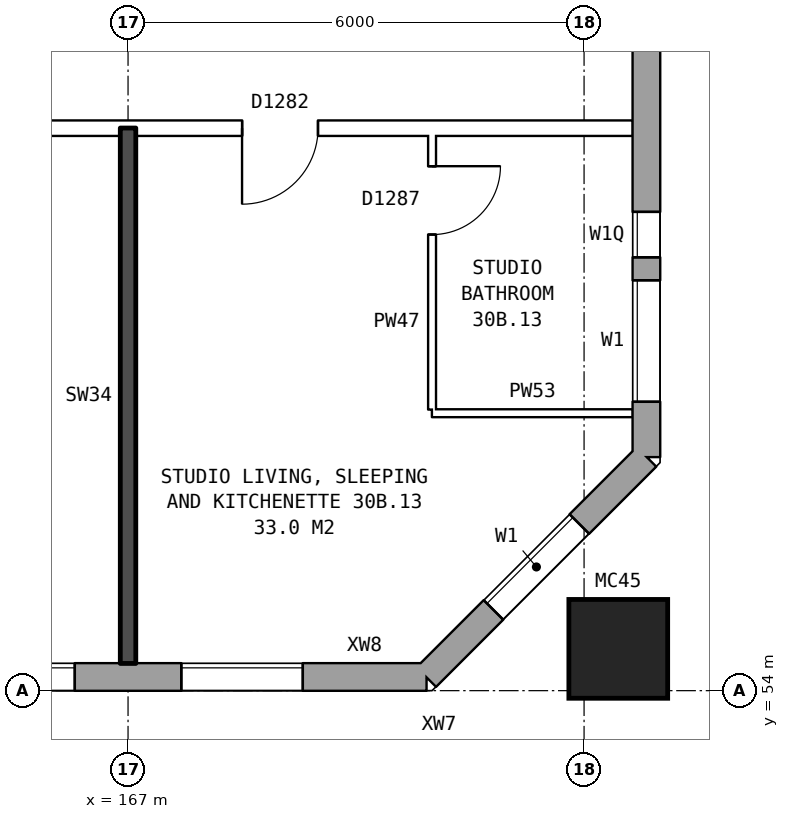
"""IFC4 building model, lengths in metres.
Left out: names, types, materials, properties, quantities, classifications, styles, units other than length and angle.
Written with IfcOpenShell. Run it as: python <this file> out.ifc"""

import sys

from ifc_helpers import new_model, si_unit, direction, frame, frame_2d, origin, origin_2d, place, context, subcontext, project, spatial, rectangle, hollow_rectangle, extrude, element, fill, save


model = new_model("IFC4")
c1 = context("Model", 3, precision=1e-05, world=origin(), true_north=direction((0.0, 1.0)))
c2 = subcontext(c1, "Body", "Model", "MODEL_VIEW")
j1 = project(units=[si_unit("LENGTHUNIT", "METRE"), si_unit("PLANEANGLEUNIT", "RADIAN")], contexts=[c1])
p1 = place(None, origin())
s1 = spatial("IfcSite", under=j1, at=p1, CompositionType="ELEMENT")
p2 = place(p1, origin())
s2 = spatial("IfcBuilding", under=s1, at=p2, CompositionType="ELEMENT")
p3 = place(p2, frame((0.0, 0.0, 108.8)))
s3 = spatial("IfcBuildingStorey", under=s2, at=p3, CompositionType="ELEMENT", Elevation=108.8)
p4 = place(p3, frame((173.45, 54.55, 0.0), z_axis=(0.0, 0.0, 1.0), x_axis=(1.0, 0.0, 0.0)))
e1 = element("IfcColumn", 1, at=p4, inside=s3, PredefinedType="COLUMN", context=c2, shape_type="SweptSolid", body=[
    extrude(hollow_rectangle(XDim=1.3, YDim=1.3, WallThickness=0.07, at=origin_2d()), origin(), (0.0, 0.0, 1.0), 3.1),
])
p5 = place(p3, frame((134.075, 54.18, 0.0), z_axis=(0.0, 0.0, 1.0), x_axis=(1.0, 0.0, 0.0)))
e2 = element("IfcWall", 2, at=p5, inside=s3, PredefinedType="STANDARD", context=c2, shape_type="SweptSolid", body=[
    extrude(rectangle(XDim=36.851, YDim=0.36, at=frame_2d((18.425, 0.0))), origin(), (0.0, 0.0, 1.0), 2.85),
])
p6 = place(p5, frame((0.625, 0.0, 0.8)))
e3 = element("IfcOpeningElement", 3, at=p6, cuts=e2, PredefinedType="OPENING", context=c2, shape_type="SweptSolid", body=[
    extrude(rectangle(XDim=1.6, YDim=1.8, at=frame_2d((0.8, 0.9))), frame((0.0, 0.19, 0.0), z_axis=(0.0, -1.0, 0.0), x_axis=(1.0, 0.0, 0.0)), (0.0, 0.0, 1.0), 0.38),
])
p7 = place(p5, frame((3.625, 0.0, 0.8)))
e4 = element("IfcOpeningElement", 4, at=p7, cuts=e2, PredefinedType="OPENING", context=c2, shape_type="SweptSolid", body=[
    extrude(rectangle(XDim=1.6, YDim=1.8, at=frame_2d((0.8, 0.9))), frame((0.0, 0.19, 0.0), z_axis=(0.0, -1.0, 0.0), x_axis=(1.0, 0.0, 0.0)), (0.0, 0.0, 1.0), 0.38),
])
p8 = place(p5, frame((6.625, 0.0, 0.8)))
e5 = element("IfcOpeningElement", 5, at=p8, cuts=e2, PredefinedType="OPENING", context=c2, shape_type="SweptSolid", body=[
    extrude(rectangle(XDim=1.6, YDim=1.8, at=frame_2d((0.8, 0.9))), frame((0.0, 0.19, 0.0), z_axis=(0.0, -1.0, 0.0), x_axis=(1.0, 0.0, 0.0)), (0.0, 0.0, 1.0), 0.38),
])
p9 = place(p5, frame((9.625, 0.0, 0.8)))
e6 = element("IfcOpeningElement", 6, at=p9, cuts=e2, PredefinedType="OPENING", context=c2, shape_type="SweptSolid", body=[
    extrude(rectangle(XDim=1.6, YDim=1.8, at=frame_2d((0.8, 0.9))), frame((0.0, 0.19, 0.0), z_axis=(0.0, -1.0, 0.0), x_axis=(1.0, 0.0, 0.0)), (0.0, 0.0, 1.0), 0.38),
])
p10 = place(p5, frame((12.075, 0.0, 1.65)))
e7 = element("IfcOpeningElement", 7, at=p10, cuts=e2, PredefinedType="OPENING", context=c2, shape_type="SweptSolid", body=[
    extrude(rectangle(XDim=1.0, YDim=0.9, at=frame_2d((0.5, 0.45))), frame((0.0, 0.19, 0.0), z_axis=(0.0, -1.0, 0.0), x_axis=(1.0, 0.0, 0.0)), (0.0, 0.0, 1.0), 0.38),
])
p11 = place(p5, frame((15.625, 0.0, 0.8)))
e8 = element("IfcOpeningElement", 8, at=p11, cuts=e2, PredefinedType="OPENING", context=c2, shape_type="SweptSolid", body=[
    extrude(rectangle(XDim=1.6, YDim=1.8, at=frame_2d((0.8, 0.9))), frame((0.0, 0.19, 0.0), z_axis=(0.0, -1.0, 0.0), x_axis=(1.0, 0.0, 0.0)), (0.0, 0.0, 1.0), 0.38),
])
p12 = place(p5, frame((18.625, 0.0, 0.8)))
e9 = element("IfcOpeningElement", 9, at=p12, cuts=e2, PredefinedType="OPENING", context=c2, shape_type="SweptSolid", body=[
    extrude(rectangle(XDim=1.6, YDim=1.8, at=frame_2d((0.8, 0.9))), frame((0.0, 0.19, 0.0), z_axis=(0.0, -1.0, 0.0), x_axis=(1.0, 0.0, 0.0)), (0.0, 0.0, 1.0), 0.38),
])
p13 = place(p5, frame((21.125, 0.0, 0.8)))
e10 = element("IfcOpeningElement", 10, at=p13, cuts=e2, PredefinedType="OPENING", context=c2, shape_type="SweptSolid", body=[
    extrude(rectangle(XDim=1.4, YDim=0.9, at=frame_2d((0.7, 0.45))), frame((0.0, 0.19, 0.0), z_axis=(0.0, -1.0, 0.0), x_axis=(1.0, 0.0, 0.0)), (0.0, 0.0, 1.0), 0.38),
])
p14 = place(p5, frame((24.625, 0.0, 0.8)))
e11 = element("IfcOpeningElement", 11, at=p14, cuts=e2, PredefinedType="OPENING", context=c2, shape_type="SweptSolid", body=[
    extrude(rectangle(XDim=1.6, YDim=1.8, at=frame_2d((0.8, 0.9))), frame((0.0, 0.19, 0.0), z_axis=(0.0, -1.0, 0.0), x_axis=(1.0, 0.0, 0.0)), (0.0, 0.0, 1.0), 0.38),
])
p15 = place(p5, frame((27.625, 0.0, 0.8)))
e12 = element("IfcOpeningElement", 12, at=p15, cuts=e2, PredefinedType="OPENING", context=c2, shape_type="SweptSolid", body=[
    extrude(rectangle(XDim=1.6, YDim=1.8, at=frame_2d((0.8, 0.9))), frame((0.0, 0.19, 0.0), z_axis=(0.0, -1.0, 0.0), x_axis=(1.0, 0.0, 0.0)), (0.0, 0.0, 1.0), 0.38),
])
p16 = place(p5, frame((30.625, 0.0, 0.8)))
e13 = element("IfcOpeningElement", 13, at=p16, cuts=e2, PredefinedType="OPENING", context=c2, shape_type="SweptSolid", body=[
    extrude(rectangle(XDim=1.6, YDim=1.8, at=frame_2d((0.8, 0.9))), frame((0.0, 0.19, 0.0), z_axis=(0.0, -1.0, 0.0), x_axis=(1.0, 0.0, 0.0)), (0.0, 0.0, 1.0), 0.38),
])
p17 = place(p5, frame((33.625, 0.0, 0.8)))
e14 = element("IfcOpeningElement", 14, at=p17, cuts=e2, PredefinedType="OPENING", context=c2, shape_type="SweptSolid", body=[
    extrude(rectangle(XDim=1.6, YDim=1.8, at=frame_2d((0.8, 0.9))), frame((0.0, 0.19, 0.0), z_axis=(0.0, -1.0, 0.0), x_axis=(1.0, 0.0, 0.0)), (0.0, 0.0, 1.0), 0.38),
])
p18 = place(p5, frame((13.525, 0.0, 0.15)))
e15 = element("IfcOpeningElement", 15, at=p18, cuts=e2, PredefinedType="OPENING", context=c2, shape_type="SweptSolid", body=[
    extrude(rectangle(XDim=1.2, YDim=0.9, at=frame_2d((0.6, 0.45))), frame((0.0, 0.19, 0.0), z_axis=(0.0, -1.0, 0.0), x_axis=(1.0, 0.0, 0.0)), (0.0, 0.0, 1.0), 0.38),
])
p19 = place(p5, frame((23.725, 0.0, 1.7)))
e16 = element("IfcOpeningElement", 16, at=p19, cuts=e2, PredefinedType="OPENING", context=c2, shape_type="SweptSolid", body=[
    extrude(rectangle(XDim=0.6, YDim=0.9, at=frame_2d((0.3, 0.45))), frame((0.0, 0.19, 0.0), z_axis=(0.0, -1.0, 0.0), x_axis=(1.0, 0.0, 0.0)), (0.0, 0.0, 1.0), 0.38),
])
p20 = place(p3, frame((170.925, 54.18, 0.0), z_axis=(0.0, 0.0, 1.0), x_axis=(0.707106781187, 0.707106781187, 0.0)))
e17 = element("IfcWall", 17, at=p20, inside=s3, PredefinedType="STANDARD", context=c2, shape_type="SweptSolid", body=[
    extrude(rectangle(XDim=4.094, YDim=0.36, at=frame_2d((2.047, 0.0))), origin(), (0.0, 0.0, 1.0), 2.85),
])
p21 = place(p20, frame((1.247, 0.0, 0.8)))
e18 = element("IfcOpeningElement", 18, at=p21, cuts=e17, PredefinedType="OPENING", context=c2, shape_type="SweptSolid", body=[
    extrude(rectangle(XDim=1.6, YDim=1.8, at=frame_2d((0.8, 0.9))), frame((0.0, 0.19, 0.0), z_axis=(0.0, -1.0, 0.0), x_axis=(1.0, 0.0, 0.0)), (0.0, 0.0, 1.0), 0.38),
])
p22 = place(p3, frame((173.82, 57.075, 0.0), z_axis=(0.0, 0.0, 1.0), x_axis=(0.0, 1.0, 0.0)))
e19 = element("IfcWall", 19, at=p22, inside=s3, PredefinedType="STANDARD", context=c2, shape_type="SweptSolid", body=[
    extrude(rectangle(XDim=25.851, YDim=0.36, at=frame_2d((12.925, 0.0))), origin(), (0.0, 0.0, 1.0), 2.85),
])
p23 = place(p22, frame((0.725, 0.0, 0.8)))
e20 = element("IfcOpeningElement", 20, at=p23, cuts=e19, PredefinedType="OPENING", context=c2, shape_type="SweptSolid", body=[
    extrude(rectangle(XDim=1.6, YDim=1.8, at=frame_2d((0.8, 0.9))), frame((0.0, 0.19, 0.0), z_axis=(0.0, -1.0, 0.0), x_axis=(1.0, 0.0, 0.0)), (0.0, 0.0, 1.0), 0.38),
])
p24 = place(p22, frame((5.525, 0.0, 1.4)))
e21 = element("IfcOpeningElement", 21, at=p24, cuts=e19, PredefinedType="OPENING", context=c2, shape_type="SweptSolid", body=[
    extrude(rectangle(XDim=1.4, YDim=1.2, at=frame_2d((0.7, 0.6))), frame((0.0, 0.19, 0.0), z_axis=(0.0, -1.0, 0.0), x_axis=(1.0, 0.0, 0.0)), (0.0, 0.0, 1.0), 0.38),
])
p25 = place(p22, frame((7.625, 0.0, 0.8)))
e22 = element("IfcOpeningElement", 22, at=p25, cuts=e19, PredefinedType="OPENING", context=c2, shape_type="SweptSolid", body=[
    extrude(rectangle(XDim=1.6, YDim=1.8, at=frame_2d((0.8, 0.9))), frame((0.0, 0.19, 0.0), z_axis=(0.0, -1.0, 0.0), x_axis=(1.0, 0.0, 0.0)), (0.0, 0.0, 1.0), 0.38),
])
p26 = place(p22, frame((10.625, 0.0, 0.8)))
e23 = element("IfcOpeningElement", 23, at=p26, cuts=e19, PredefinedType="OPENING", context=c2, shape_type="SweptSolid", body=[
    extrude(rectangle(XDim=1.6, YDim=1.8, at=frame_2d((0.8, 0.9))), frame((0.0, 0.19, 0.0), z_axis=(0.0, -1.0, 0.0), x_axis=(1.0, 0.0, 0.0)), (0.0, 0.0, 1.0), 0.38),
])
p27 = place(p22, frame((13.625, 0.0, 0.8)))
e24 = element("IfcOpeningElement", 24, at=p27, cuts=e19, PredefinedType="OPENING", context=c2, shape_type="SweptSolid", body=[
    extrude(rectangle(XDim=1.6, YDim=1.8, at=frame_2d((0.8, 0.9))), frame((0.0, 0.19, 0.0), z_axis=(0.0, -1.0, 0.0), x_axis=(1.0, 0.0, 0.0)), (0.0, 0.0, 1.0), 0.38),
])
p28 = place(p22, frame((16.625, 0.0, 0.8)))
e25 = element("IfcOpeningElement", 25, at=p28, cuts=e19, PredefinedType="OPENING", context=c2, shape_type="SweptSolid", body=[
    extrude(rectangle(XDim=1.6, YDim=1.8, at=frame_2d((0.8, 0.9))), frame((0.0, 0.19, 0.0), z_axis=(0.0, -1.0, 0.0), x_axis=(1.0, 0.0, 0.0)), (0.0, 0.0, 1.0), 0.38),
])
p29 = place(p22, frame((9.525, 0.0, 0.8)))
e26 = element("IfcOpeningElement", 26, at=p29, cuts=e19, PredefinedType="OPENING", context=c2, shape_type="SweptSolid", body=[
    extrude(rectangle(XDim=0.8, YDim=1.8, at=frame_2d((0.4, 0.9))), frame((0.0, 0.19, 0.0), z_axis=(0.0, -1.0, 0.0), x_axis=(1.0, 0.0, 0.0)), (0.0, 0.0, 1.0), 0.38),
])
p30 = place(p22, frame((22.475, 0.0, 0.8)))
e27 = element("IfcOpeningElement", 27, at=p30, cuts=e19, PredefinedType="OPENING", context=c2, shape_type="SweptSolid", body=[
    extrude(rectangle(XDim=1.0, YDim=1.2, at=frame_2d((0.5, 0.6))), frame((0.0, 0.19, 0.0), z_axis=(0.0, -1.0, 0.0), x_axis=(1.0, 0.0, 0.0)), (0.0, 0.0, 1.0), 0.38),
])
p31 = place(p22, frame((2.625, 0.0, 0.8)))
e28 = element("IfcOpeningElement", 28, at=p31, cuts=e19, PredefinedType="OPENING", context=c2, shape_type="SweptSolid", body=[
    extrude(rectangle(XDim=0.6, YDim=1.2, at=frame_2d((0.3, 0.6))), frame((0.0, 0.19, 0.0), z_axis=(0.0, -1.0, 0.0), x_axis=(1.0, 0.0, 0.0)), (0.0, 0.0, 1.0), 0.38),
])
p32 = place(p22, frame((12.525, 0.0, 0.8)))
e29 = element("IfcOpeningElement", 29, at=p32, cuts=e19, PredefinedType="OPENING", context=c2, shape_type="SweptSolid", body=[
    extrude(rectangle(XDim=0.8, YDim=1.8, at=frame_2d((0.4, 0.9))), frame((0.0, 0.19, 0.0), z_axis=(0.0, -1.0, 0.0), x_axis=(1.0, 0.0, 0.0)), (0.0, 0.0, 1.0), 0.38),
])
p33 = place(p22, frame((15.525, 0.0, 0.8)))
e30 = element("IfcOpeningElement", 30, at=p33, cuts=e19, PredefinedType="OPENING", context=c2, shape_type="SweptSolid", body=[
    extrude(rectangle(XDim=0.8, YDim=1.8, at=frame_2d((0.4, 0.9))), frame((0.0, 0.19, 0.0), z_axis=(0.0, -1.0, 0.0), x_axis=(1.0, 0.0, 0.0)), (0.0, 0.0, 1.0), 0.38),
])
p34 = place(p22, frame((18.525, 0.0, 0.8)))
e31 = element("IfcOpeningElement", 31, at=p34, cuts=e19, PredefinedType="OPENING", context=c2, shape_type="SweptSolid", body=[
    extrude(rectangle(XDim=0.8, YDim=1.8, at=frame_2d((0.4, 0.9))), frame((0.0, 0.19, 0.0), z_axis=(0.0, -1.0, 0.0), x_axis=(1.0, 0.0, 0.0)), (0.0, 0.0, 1.0), 0.38),
])
p35 = place(p22, frame((23.775, 0.0, 0.8)))
e32 = element("IfcOpeningElement", 32, at=p35, cuts=e19, PredefinedType="OPENING", context=c2, shape_type="SweptSolid", body=[
    extrude(rectangle(XDim=1.4, YDim=1.8, at=frame_2d((0.7, 0.9))), frame((0.0, 0.19, 0.0), z_axis=(0.0, -1.0, 0.0), x_axis=(1.0, 0.0, 0.0)), (0.0, 0.0, 1.0), 0.38),
])
p36 = place(p3, frame((171.0, 57.65, 0.0), z_axis=(0.0, 0.0, 1.0), x_axis=(1.0, 0.0, 0.0)))
e33 = element("IfcWall", 33, at=p36, inside=s3, PredefinedType="PARTITIONING", context=c2, shape_type="SweptSolid", body=[
    extrude(rectangle(XDim=2.64, YDim=0.1, at=frame_2d((1.32, 0.0))), origin(), (0.0, 0.0, 1.0), 2.85),
])
p37 = place(p3, frame((155.1, 61.4, 0.0), z_axis=(0.0, 0.0, 1.0), x_axis=(1.0, 0.0, 0.0)))
e34 = element("IfcWall", 34, at=p37, inside=s3, PredefinedType="PARTITIONING", context=c2, shape_type="SweptSolid", body=[
    extrude(rectangle(XDim=18.54, YDim=0.2, at=frame_2d((9.27, 0.0))), origin(), (0.0, 0.0, 1.0), 2.85),
])
p38 = place(p37, frame((1.45, 0.0, 0.0)))
e35 = element("IfcOpeningElement", 35, at=p38, cuts=e34, PredefinedType="OPENING", context=c2, shape_type="SweptSolid", body=[
    extrude(rectangle(XDim=1.0, YDim=2.1, at=frame_2d((0.5, 1.05))), frame((0.0, 0.11, 0.0), z_axis=(0.0, -1.0, 0.0), x_axis=(1.0, 0.0, 0.0)), (0.0, 0.0, 1.0), 0.22),
])
p39 = place(p37, frame((9.6, 0.0, 0.0)))
e36 = element("IfcOpeningElement", 36, at=p39, cuts=e34, PredefinedType="OPENING", context=c2, shape_type="SweptSolid", body=[
    extrude(rectangle(XDim=1.0, YDim=2.1, at=frame_2d((0.5, 1.05))), frame((0.0, 0.11, 0.0), z_axis=(0.0, -1.0, 0.0), x_axis=(1.0, 0.0, 0.0)), (0.0, 0.0, 1.0), 0.22),
])
p40 = place(p37, frame((13.4, 0.0, 0.0)))
e37 = element("IfcOpeningElement", 37, at=p40, cuts=e34, PredefinedType="OPENING", context=c2, shape_type="SweptSolid", body=[
    extrude(rectangle(XDim=1.0, YDim=2.1, at=frame_2d((0.5, 1.05))), frame((0.0, 0.11, 0.0), z_axis=(0.0, -1.0, 0.0), x_axis=(1.0, 0.0, 0.0)), (0.0, 0.0, 1.0), 0.22),
])
p41 = place(p3, frame((167.0, 54.36, 0.0), z_axis=(0.0, 0.0, 1.0), x_axis=(0.0, 1.0, 0.0)))
e38 = element("IfcWall", 38, at=p41, inside=s3, PredefinedType="SOLIDWALL", context=c2, shape_type="SweptSolid", body=[
    extrude(rectangle(XDim=7.04, YDim=0.2, at=frame_2d((3.52, 0.0))), origin(), (0.0, 0.0, 1.0), 2.85),
])
p42 = place(p3, frame((171.0, 57.7, 0.0), z_axis=(0.0, 0.0, 1.0), x_axis=(0.0, 1.0, 0.0)))
e39 = element("IfcWall", 39, at=p42, inside=s3, PredefinedType="PARTITIONING", context=c2, shape_type="SweptSolid", body=[
    extrude(rectangle(XDim=3.6, YDim=0.1, at=frame_2d((1.8, 0.0))), origin(), (0.0, 0.0, 1.0), 2.85),
])
p43 = place(p42, frame((2.3, 0.0, 0.0)))
e40 = element("IfcOpeningElement", 40, at=p43, cuts=e39, PredefinedType="OPENING", context=c2, shape_type="SweptSolid", body=[
    extrude(rectangle(XDim=0.9, YDim=2.1, at=frame_2d((0.45, 1.05))), frame((0.0, 0.06, 0.0), z_axis=(0.0, -1.0, 0.0), x_axis=(1.0, 0.0, 0.0)), (0.0, 0.0, 1.0), 0.12),
])
p44 = place(p16, origin())
e41 = element("IfcWindow", 41, at=p44, inside=s3, PartitioningType="SINGLE_PANEL", PredefinedType="WINDOW", context=c2, shape_type="SweptSolid", body=[
    extrude(rectangle(XDim=1.6, YDim=1.8, at=frame_2d((0.8, 0.9))), frame((0.0, 0.15, 0.0), z_axis=(0.0, -1.0, 0.0), x_axis=(1.0, 0.0, 0.0)), (0.0, 0.0, 1.0), 0.06),
])
fill(e13, e41)
p45 = place(p17, origin())
e42 = element("IfcWindow", 42, at=p45, inside=s3, PartitioningType="SINGLE_PANEL", PredefinedType="WINDOW", context=c2, shape_type="SweptSolid", body=[
    extrude(rectangle(XDim=1.6, YDim=1.8, at=frame_2d((0.8, 0.9))), frame((0.0, 0.15, 0.0), z_axis=(0.0, -1.0, 0.0), x_axis=(1.0, 0.0, 0.0)), (0.0, 0.0, 1.0), 0.06),
])
fill(e14, e42)
p46 = place(p21, origin())
e43 = element("IfcWindow", 43, at=p46, inside=s3, PartitioningType="SINGLE_PANEL", PredefinedType="WINDOW", context=c2, shape_type="SweptSolid", body=[
    extrude(rectangle(XDim=1.6, YDim=1.8, at=frame_2d((0.8, 0.9))), frame((0.0, 0.15, 0.0), z_axis=(0.0, -1.0, 0.0), x_axis=(1.0, 0.0, 0.0)), (0.0, 0.0, 1.0), 0.06),
])
fill(e18, e43)
p47 = place(p23, origin())
e44 = element("IfcWindow", 44, at=p47, inside=s3, PartitioningType="SINGLE_PANEL", PredefinedType="WINDOW", context=c2, shape_type="SweptSolid", body=[
    extrude(rectangle(XDim=1.6, YDim=1.8, at=frame_2d((0.8, 0.9))), frame((0.0, 0.15, 0.0), z_axis=(0.0, -1.0, 0.0), x_axis=(1.0, 0.0, 0.0)), (0.0, 0.0, 1.0), 0.06),
])
fill(e20, e44)
p48 = place(p40, frame((1.0, 0.0, 0.0), z_axis=(0.0, 0.0, 1.0), x_axis=(-1.0, 0.0, 0.0)))
e45 = element("IfcDoor", 45, at=p48, inside=s3, OperationType="SINGLE_SWING_RIGHT", PredefinedType="DOOR", context=c2, shape_type="SweptSolid", body=[
    extrude(rectangle(XDim=1.0, YDim=2.1, at=frame_2d((0.5, 1.05))), frame((0.0, 0.025, 0.0), z_axis=(0.0, -1.0, 0.0), x_axis=(1.0, 0.0, 0.0)), (0.0, 0.0, 1.0), 0.05),
])
fill(e37, e45)
p49 = place(p43, frame((0.9, 0.0, 0.0), z_axis=(0.0, 0.0, 1.0), x_axis=(-1.0, 0.0, 0.0)))
e46 = element("IfcDoor", 46, at=p49, inside=s3, OperationType="SINGLE_SWING_LEFT", PredefinedType="DOOR", context=c2, shape_type="SweptSolid", body=[
    extrude(rectangle(XDim=0.9, YDim=2.1, at=frame_2d((0.45, 1.05))), frame((0.0, 0.025, 0.0), z_axis=(0.0, -1.0, 0.0), x_axis=(1.0, 0.0, 0.0)), (0.0, 0.0, 1.0), 0.05),
])
fill(e40, e46)
p50 = place(p31, origin())
e47 = element("IfcWindow", 47, at=p50, inside=s3, PartitioningType="SINGLE_PANEL", PredefinedType="WINDOW", context=c2, shape_type="SweptSolid", body=[
    extrude(rectangle(XDim=0.6, YDim=1.2, at=frame_2d((0.3, 0.6))), frame((0.0, 0.15, 0.0), z_axis=(0.0, -1.0, 0.0), x_axis=(1.0, 0.0, 0.0)), (0.0, 0.0, 1.0), 0.06),
])
fill(e28, e47)
save(model, sys.argv[1])
